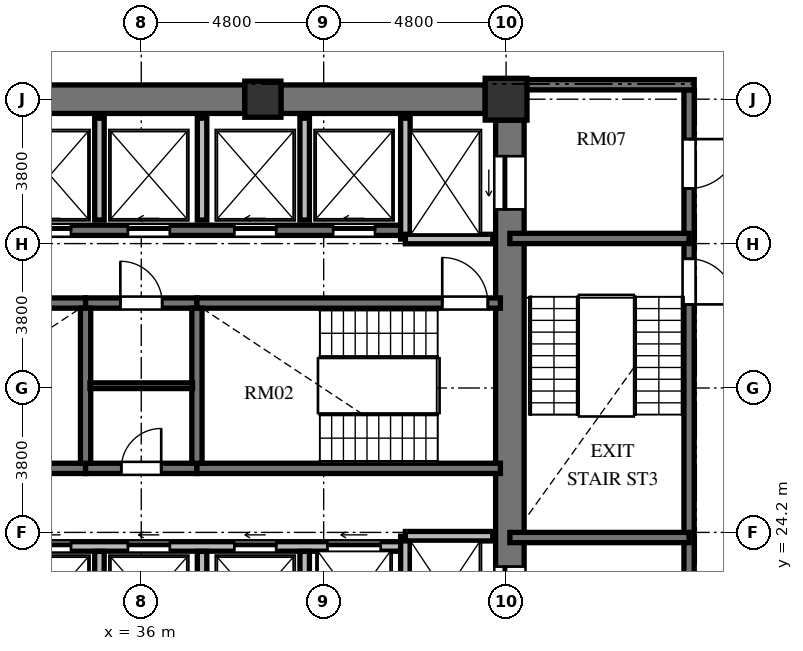
"""IFC4 building model, lengths in metres.
Left out: names, types, materials, properties, quantities, classifications, styles, units other than length and angle.
Written with IfcOpenShell. Run it as: python <this file> out.ifc"""

import sys

from ifc_helpers import new_model, si_unit, direction, frame, frame_2d, origin, origin_2d, place, context, subcontext, project, spatial, rectangle, extrude, element, fill, save


model = new_model("IFC4")
c1 = context("Model", 3, precision=1e-05, world=origin(), true_north=direction((0.0, 1.0)))
c2 = subcontext(c1, "Body", "Model", "MODEL_VIEW")
j1 = project(units=[si_unit("LENGTHUNIT", "METRE"), si_unit("PLANEANGLEUNIT", "RADIAN")], contexts=[c1])
p1 = place(None, origin())
s1 = spatial("IfcSite", under=j1, at=p1, CompositionType="ELEMENT")
p2 = place(p1, origin())
s2 = spatial("IfcBuilding", under=s1, at=p2, CompositionType="ELEMENT")
p3 = place(p2, frame((0.0, 0.0, 103.632)))
s3 = spatial("IfcBuildingStorey", under=s2, at=p3, CompositionType="ELEMENT", Elevation=103.632)
p4 = place(p3, frame((45.6, 35.6, 0.0), z_axis=(0.0, 0.0, 1.0), x_axis=(1.0, 0.0, 0.0)))
e1 = element("IfcColumn", 1, at=p4, inside=s3, PredefinedType="COLUMN", context=c2, shape_type="SweptSolid", body=[
    extrude(rectangle(XDim=1.1, YDim=1.1, at=origin_2d()), origin(), (0.0, 0.0, 1.0), 3.648),
])
p5 = place(p3, frame((39.2, 35.6, 0.0), z_axis=(0.0, 0.0, 1.0), x_axis=(1.0, 0.0, 0.0)))
e2 = element("IfcColumn", 2, at=p5, inside=s3, PredefinedType="COLUMN", context=c2, shape_type="SweptSolid", body=[
    extrude(rectangle(XDim=0.95, YDim=0.95, at=origin_2d()), origin(), (0.0, 0.0, 1.0), 3.648),
])
p6 = place(p3, frame((45.7, 20.95, 0.0), z_axis=(0.0, 0.0, 1.0), x_axis=(0.0, 1.0, 0.0)))
e3 = element("IfcWall", 3, at=p6, inside=s3, PredefinedType="SHEAR", context=c2, shape_type="SweptSolid", body=[
    extrude(rectangle(XDim=14.1, YDim=0.75, at=frame_2d((7.05, 0.0))), origin(), (0.0, 0.0, 1.0), 3.648),
])
p7 = place(p6, frame((11.75, 0.0, 0.0)))
e4 = element("IfcOpeningElement", 4, at=p7, cuts=e3, PredefinedType="OPENING", context=c2, shape_type="SweptSolid", body=[
    extrude(rectangle(XDim=1.4, YDim=2.3, at=frame_2d((0.7, 1.15))), frame((0.0, 0.385, 0.0), z_axis=(0.0, -1.0, 0.0), x_axis=(1.0, 0.0, 0.0)), (0.0, 0.0, 1.0), 0.77),
])
p8 = place(p6, frame((0.95, 0.0, 0.0)))
e5 = element("IfcOpeningElement", 5, at=p8, cuts=e3, PredefinedType="OPENING", context=c2, shape_type="SweptSolid", body=[
    extrude(rectangle(XDim=1.4, YDim=2.3, at=frame_2d((0.7, 1.15))), frame((0.0, 0.385, 0.0), z_axis=(0.0, -1.0, 0.0), x_axis=(1.0, 0.0, 0.0)), (0.0, 0.0, 1.0), 0.77),
])
p9 = place(p3, frame((33.275, 35.6, 0.0), z_axis=(0.0, 0.0, 1.0), x_axis=(1.0, 0.0, 0.0)))
e6 = element("IfcWall", 6, at=p9, inside=s3, PredefinedType="SHEAR", context=c2, shape_type="SweptSolid", body=[
    extrude(rectangle(XDim=5.45, YDim=0.75, at=frame_2d((2.725, 0.0))), origin(), (0.0, 0.0, 1.0), 3.648),
])
p10 = place(p3, frame((39.675, 35.6, 0.0), z_axis=(0.0, 0.0, 1.0), x_axis=(1.0, 0.0, 0.0)))
e7 = element("IfcWall", 7, at=p10, inside=s3, PredefinedType="SHEAR", context=c2, shape_type="SweptSolid", body=[
    extrude(rectangle(XDim=5.375, YDim=0.75, at=frame_2d((2.688, 0.0))), origin(), (0.0, 0.0, 1.0), 3.648),
])
p11 = place(p3, frame((26.55, 30.235, 0.0), z_axis=(0.0, 0.0, 1.0), x_axis=(1.0, 0.0, 0.0)))
e8 = element("IfcWall", 8, at=p11, inside=s3, PredefinedType="SHEAR", context=c2, shape_type="SweptSolid", body=[
    extrude(rectangle(XDim=7.985, YDim=0.27, at=frame_2d((3.992, 0.0))), origin(), (0.0, 0.0, 1.0), 3.648),
])
p12 = place(p3, frame((34.535, 30.235, 0.0), z_axis=(0.0, 0.0, 1.0), x_axis=(1.0, 0.0, 0.0)))
e9 = element("IfcWall", 9, at=p12, inside=s3, PredefinedType="SHEAR", context=c2, shape_type="SweptSolid", body=[
    extrude(rectangle(XDim=2.93, YDim=0.27, at=frame_2d((1.465, 0.0))), origin(), (0.0, 0.0, 1.0), 3.648),
])
p13 = place(p12, frame((0.915, 0.0, 0.0)))
e10 = element("IfcOpeningElement", 10, at=p13, cuts=e9, PredefinedType="OPENING", context=c2, shape_type="SweptSolid", body=[
    extrude(rectangle(XDim=1.1, YDim=2.15, at=frame_2d((0.55, 1.075))), frame((0.0, 0.145, 0.0), z_axis=(0.0, -1.0, 0.0), x_axis=(1.0, 0.0, 0.0)), (0.0, 0.0, 1.0), 0.29),
])
p14 = place(p3, frame((37.465, 30.235, 0.0), z_axis=(0.0, 0.0, 1.0), x_axis=(1.0, 0.0, 0.0)))
e11 = element("IfcWall", 11, at=p14, inside=s3, PredefinedType="SHEAR", context=c2, shape_type="SweptSolid", body=[
    extrude(rectangle(XDim=7.985, YDim=0.27, at=frame_2d((3.992, 0.0))), origin(), (0.0, 0.0, 1.0), 3.648),
])
p15 = place(p14, frame((6.455, 0.0, 0.0)))
e12 = element("IfcOpeningElement", 12, at=p15, cuts=e11, PredefinedType="OPENING", context=c2, shape_type="SweptSolid", body=[
    extrude(rectangle(XDim=1.2, YDim=2.15, at=frame_2d((0.6, 1.075))), frame((0.0, 0.145, 0.0), z_axis=(0.0, -1.0, 0.0), x_axis=(1.0, 0.0, 0.0)), (0.0, 0.0, 1.0), 0.29),
])
p16 = place(p3, frame((26.55, 25.885, 0.0), z_axis=(0.0, 0.0, 1.0), x_axis=(1.0, 0.0, 0.0)))
e13 = element("IfcWall", 13, at=p16, inside=s3, PredefinedType="SHEAR", context=c2, shape_type="SweptSolid", body=[
    extrude(rectangle(XDim=7.985, YDim=0.27, at=frame_2d((3.992, 0.0))), origin(), (0.0, 0.0, 1.0), 3.648),
])
p17 = place(p3, frame((34.535, 25.885, 0.0), z_axis=(0.0, 0.0, 1.0), x_axis=(1.0, 0.0, 0.0)))
e14 = element("IfcWall", 14, at=p17, inside=s3, PredefinedType="SHEAR", context=c2, shape_type="SweptSolid", body=[
    extrude(rectangle(XDim=2.93, YDim=0.27, at=frame_2d((1.465, 0.0))), origin(), (0.0, 0.0, 1.0), 3.648),
])
p18 = place(p17, frame((0.94, 0.0, 0.0)))
e15 = element("IfcOpeningElement", 15, at=p18, cuts=e14, PredefinedType="OPENING", context=c2, shape_type="SweptSolid", body=[
    extrude(rectangle(XDim=1.05, YDim=2.15, at=frame_2d((0.525, 1.075))), frame((0.0, 0.145, 0.0), z_axis=(0.0, -1.0, 0.0), x_axis=(1.0, 0.0, 0.0)), (0.0, 0.0, 1.0), 0.29),
])
p19 = place(p3, frame((37.465, 25.885, 0.0), z_axis=(0.0, 0.0, 1.0), x_axis=(1.0, 0.0, 0.0)))
e16 = element("IfcWall", 16, at=p19, inside=s3, PredefinedType="SHEAR", context=c2, shape_type="SweptSolid", body=[
    extrude(rectangle(XDim=7.985, YDim=0.27, at=frame_2d((3.992, 0.0))), origin(), (0.0, 0.0, 1.0), 3.648),
])
for number, where, z_axis, x_axis in (
    (17, (34.535, 26.02, 0.0), (0.0, 0.0, 1.0), (0.0, 1.0, 0.0)),
    (18, (37.465, 26.02, 0.0), (0.0, 0.0, 1.0), (0.0, 1.0, 0.0)),
):
    element("IfcWall", number, at=place(p3, frame(where, z_axis=z_axis, x_axis=x_axis)), inside=s3, PredefinedType="SHEAR", context=c2, shape_type="SweptSolid", body=[
        extrude(rectangle(XDim=4.08, YDim=0.27, at=frame_2d((2.04, 0.0))), origin(), (0.0, 0.0, 1.0), 3.648),
    ])
p20 = place(p3, frame((34.65, 28.06, 0.0), z_axis=(0.0, 0.0, 1.0), x_axis=(1.0, 0.0, 0.0)))
e19 = element("IfcWall", 19, at=p20, inside=s3, PredefinedType="PARTITIONING", context=c2, shape_type="SweptSolid", body=[
    extrude(rectangle(XDim=2.7, YDim=0.15, at=frame_2d((1.35, 0.0))), origin(), (0.0, 0.0, 1.0), 3.428),
])
p21 = place(p3, frame((26.55, 32.15, 0.0), z_axis=(0.0, 0.0, 1.0), x_axis=(1.0, 0.0, 0.0)))
e20 = element("IfcWall", 20, at=p21, inside=s3, PredefinedType="SHEAR", context=c2, shape_type="SweptSolid", body=[
    extrude(rectangle(XDim=16.4, YDim=0.27, at=frame_2d((8.2, 0.0))), origin(), (0.0, 0.0, 1.0), 3.648),
])
p22 = place(p21, frame((1.1, 0.0, 0.0)))
e21 = element("IfcOpeningElement", 21, at=p22, cuts=e20, PredefinedType="OPENING", context=c2, shape_type="SweptSolid", body=[
    extrude(rectangle(XDim=1.1, YDim=2.2, at=frame_2d((0.55, 1.1))), frame((0.0, 0.145, 0.0), z_axis=(0.0, -1.0, 0.0), x_axis=(1.0, 0.0, 0.0)), (0.0, 0.0, 1.0), 0.29),
])
p23 = place(p21, frame((3.7, 0.0, 0.0)))
e22 = element("IfcOpeningElement", 22, at=p23, cuts=e20, PredefinedType="OPENING", context=c2, shape_type="SweptSolid", body=[
    extrude(rectangle(XDim=1.1, YDim=2.2, at=frame_2d((0.55, 1.1))), frame((0.0, 0.145, 0.0), z_axis=(0.0, -1.0, 0.0), x_axis=(1.0, 0.0, 0.0)), (0.0, 0.0, 1.0), 0.29),
])
p24 = place(p21, frame((6.5, 0.0, 0.0)))
e23 = element("IfcOpeningElement", 23, at=p24, cuts=e20, PredefinedType="OPENING", context=c2, shape_type="SweptSolid", body=[
    extrude(rectangle(XDim=1.1, YDim=2.2, at=frame_2d((0.55, 1.1))), frame((0.0, 0.145, 0.0), z_axis=(0.0, -1.0, 0.0), x_axis=(1.0, 0.0, 0.0)), (0.0, 0.0, 1.0), 0.29),
])
p25 = place(p21, frame((9.1, 0.0, 0.0)))
e24 = element("IfcOpeningElement", 24, at=p25, cuts=e20, PredefinedType="OPENING", context=c2, shape_type="SweptSolid", body=[
    extrude(rectangle(XDim=1.1, YDim=2.2, at=frame_2d((0.55, 1.1))), frame((0.0, 0.145, 0.0), z_axis=(0.0, -1.0, 0.0), x_axis=(1.0, 0.0, 0.0)), (0.0, 0.0, 1.0), 0.29),
])
p26 = place(p21, frame((11.9, 0.0, 0.0)))
e25 = element("IfcOpeningElement", 25, at=p26, cuts=e20, PredefinedType="OPENING", context=c2, shape_type="SweptSolid", body=[
    extrude(rectangle(XDim=1.1, YDim=2.2, at=frame_2d((0.55, 1.1))), frame((0.0, 0.145, 0.0), z_axis=(0.0, -1.0, 0.0), x_axis=(1.0, 0.0, 0.0)), (0.0, 0.0, 1.0), 0.29),
])
p27 = place(p21, frame((14.5, 0.0, 0.0)))
e26 = element("IfcOpeningElement", 26, at=p27, cuts=e20, PredefinedType="OPENING", context=c2, shape_type="SweptSolid", body=[
    extrude(rectangle(XDim=1.1, YDim=2.2, at=frame_2d((0.55, 1.1))), frame((0.0, 0.145, 0.0), z_axis=(0.0, -1.0, 0.0), x_axis=(1.0, 0.0, 0.0)), (0.0, 0.0, 1.0), 0.29),
])
p28 = place(p3, frame((26.75, 23.83, 0.0), z_axis=(0.0, 0.0, 1.0), x_axis=(1.0, 0.0, 0.0)))
e27 = element("IfcWall", 27, at=p28, inside=s3, PredefinedType="SOLIDWALL", context=c2, shape_type="SweptSolid", body=[
    extrude(rectangle(XDim=16.2, YDim=0.25, at=frame_2d((8.1, 0.0))), origin(), (0.0, 0.0, 1.0), 3.428),
])
p29 = place(p28, frame((0.9, 0.0, 0.0)))
e28 = element("IfcOpeningElement", 28, at=p29, cuts=e27, PredefinedType="OPENING", context=c2, shape_type="SweptSolid", body=[
    extrude(rectangle(XDim=1.1, YDim=2.2, at=frame_2d((0.55, 1.1))), frame((0.0, 0.135, 0.0), z_axis=(0.0, -1.0, 0.0), x_axis=(1.0, 0.0, 0.0)), (0.0, 0.0, 1.0), 0.27),
])
p30 = place(p28, frame((3.5, 0.0, 0.0)))
e29 = element("IfcOpeningElement", 29, at=p30, cuts=e27, PredefinedType="OPENING", context=c2, shape_type="SweptSolid", body=[
    extrude(rectangle(XDim=1.1, YDim=2.2, at=frame_2d((0.55, 1.1))), frame((0.0, 0.135, 0.0), z_axis=(0.0, -1.0, 0.0), x_axis=(1.0, 0.0, 0.0)), (0.0, 0.0, 1.0), 0.27),
])
p31 = place(p28, frame((6.3, 0.0, 0.0)))
e30 = element("IfcOpeningElement", 30, at=p31, cuts=e27, PredefinedType="OPENING", context=c2, shape_type="SweptSolid", body=[
    extrude(rectangle(XDim=1.1, YDim=2.2, at=frame_2d((0.55, 1.1))), frame((0.0, 0.135, 0.0), z_axis=(0.0, -1.0, 0.0), x_axis=(1.0, 0.0, 0.0)), (0.0, 0.0, 1.0), 0.27),
])
p32 = place(p28, frame((8.9, 0.0, 0.0)))
e31 = element("IfcOpeningElement", 31, at=p32, cuts=e27, PredefinedType="OPENING", context=c2, shape_type="SweptSolid", body=[
    extrude(rectangle(XDim=1.1, YDim=2.2, at=frame_2d((0.55, 1.1))), frame((0.0, 0.135, 0.0), z_axis=(0.0, -1.0, 0.0), x_axis=(1.0, 0.0, 0.0)), (0.0, 0.0, 1.0), 0.27),
])
p33 = place(p28, frame((11.7, 0.0, 0.0)))
e32 = element("IfcOpeningElement", 32, at=p33, cuts=e27, PredefinedType="OPENING", context=c2, shape_type="SweptSolid", body=[
    extrude(rectangle(XDim=1.1, YDim=2.2, at=frame_2d((0.55, 1.1))), frame((0.0, 0.135, 0.0), z_axis=(0.0, -1.0, 0.0), x_axis=(1.0, 0.0, 0.0)), (0.0, 0.0, 1.0), 0.27),
])
p34 = place(p28, frame((14.15, 0.0, 0.0)))
e33 = element("IfcOpeningElement", 33, at=p34, cuts=e27, PredefinedType="OPENING", context=c2, shape_type="SweptSolid", body=[
    extrude(rectangle(XDim=1.4, YDim=2.3, at=frame_2d((0.7, 1.15))), frame((0.0, 0.135, 0.0), z_axis=(0.0, -1.0, 0.0), x_axis=(1.0, 0.0, 0.0)), (0.0, 0.0, 1.0), 0.27),
])
p35 = place(p3, frame((42.95, 31.92, 0.0), z_axis=(0.0, 0.0, 1.0), x_axis=(0.0, 1.0, 0.0)))
e34 = element("IfcWall", 34, at=p35, inside=s3, PredefinedType="SOLIDWALL", context=c2, shape_type="SweptSolid", body=[
    extrude(rectangle(XDim=3.18, YDim=0.25, at=frame_2d((1.59, 0.0))), origin(), (0.0, 0.0, 1.0), 3.428),
])
p36 = place(p3, frame((42.95, 31.92, 0.0), z_axis=(0.0, 0.0, 1.0), x_axis=(1.0, 0.0, 0.0)))
e35 = element("IfcWall", 35, at=p36, inside=s3, PredefinedType="SOLIDWALL", context=c2, shape_type="SweptSolid", body=[
    extrude(rectangle(XDim=2.3, YDim=0.25, at=frame_2d((1.15, 0.0))), origin(), (0.0, 0.0, 1.0), 3.428),
])
p37 = place(p3, frame((42.95, 20.9, 0.0), z_axis=(0.0, 0.0, 1.0), x_axis=(0.0, 1.0, 0.0)))
e36 = element("IfcWall", 36, at=p37, inside=s3, PredefinedType="SOLIDWALL", context=c2, shape_type="SweptSolid", body=[
    extrude(rectangle(XDim=3.2, YDim=0.25, at=frame_2d((1.6, 0.0))), origin(), (0.0, 0.0, 1.0), 3.428),
])
p38 = place(p3, frame((42.95, 24.1, 0.0), z_axis=(0.0, 0.0, 1.0), x_axis=(1.0, 0.0, 0.0)))
e37 = element("IfcWall", 37, at=p38, inside=s3, PredefinedType="SOLIDWALL", context=c2, shape_type="SweptSolid", body=[
    extrude(rectangle(XDim=2.3, YDim=0.25, at=frame_2d((1.15, 0.0))), origin(), (0.0, 0.0, 1.0), 3.428),
])
p39 = place(p3, frame((34.9, 32.42, 0.0), z_axis=(0.0, 0.0, 1.0), x_axis=(0.0, 1.0, 0.0)))
e38 = element("IfcWall", 38, at=p39, inside=s3, PredefinedType="SOLIDWALL", context=c2, shape_type="SweptSolid", body=[
    extrude(rectangle(XDim=2.68, YDim=0.25, at=frame_2d((1.34, 0.0))), origin(), (0.0, 0.0, 1.0), 3.428),
])
p40 = place(p3, frame((34.9, 20.9, 0.0), z_axis=(0.0, 0.0, 1.0), x_axis=(0.0, 1.0, 0.0)))
e39 = element("IfcWall", 39, at=p40, inside=s3, PredefinedType="SOLIDWALL", context=c2, shape_type="SweptSolid", body=[
    extrude(rectangle(XDim=2.8, YDim=0.25, at=frame_2d((1.4, 0.0))), origin(), (0.0, 0.0, 1.0), 3.428),
])
p41 = place(p3, frame((37.6, 32.42, 0.0), z_axis=(0.0, 0.0, 1.0), x_axis=(0.0, 1.0, 0.0)))
e40 = element("IfcWall", 40, at=p41, inside=s3, PredefinedType="SOLIDWALL", context=c2, shape_type="SweptSolid", body=[
    extrude(rectangle(XDim=2.68, YDim=0.25, at=frame_2d((1.34, 0.0))), origin(), (0.0, 0.0, 1.0), 3.428),
])
p42 = place(p3, frame((37.6, 20.9, 0.0), z_axis=(0.0, 0.0, 1.0), x_axis=(0.0, 1.0, 0.0)))
e41 = element("IfcWall", 41, at=p42, inside=s3, PredefinedType="SOLIDWALL", context=c2, shape_type="SweptSolid", body=[
    extrude(rectangle(XDim=2.8, YDim=0.25, at=frame_2d((1.4, 0.0))), origin(), (0.0, 0.0, 1.0), 3.428),
])
p43 = place(p3, frame((40.3, 32.42, 0.0), z_axis=(0.0, 0.0, 1.0), x_axis=(0.0, 1.0, 0.0)))
e42 = element("IfcWall", 42, at=p43, inside=s3, PredefinedType="SOLIDWALL", context=c2, shape_type="SweptSolid", body=[
    extrude(rectangle(XDim=2.68, YDim=0.25, at=frame_2d((1.34, 0.0))), origin(), (0.0, 0.0, 1.0), 3.428),
])
p44 = place(p3, frame((40.3, 20.9, 0.0), z_axis=(0.0, 0.0, 1.0), x_axis=(0.0, 1.0, 0.0)))
e43 = element("IfcWall", 43, at=p44, inside=s3, PredefinedType="SOLIDWALL", context=c2, shape_type="SweptSolid", body=[
    extrude(rectangle(XDim=2.8, YDim=0.25, at=frame_2d((1.4, 0.0))), origin(), (0.0, 0.0, 1.0), 3.428),
])
p45 = place(p3, frame((50.415, 35.845, 0.0), z_axis=(0.0, 0.0, 1.0), x_axis=(0.0, -1.0, 0.0)))
e44 = element("IfcWall", 44, at=p45, inside=s3, PredefinedType="SHEAR", context=c2, shape_type="SweptSolid", body=[
    extrude(rectangle(XDim=15.825, YDim=0.27, at=frame_2d((7.913, 0.0))), origin(), (0.0, 0.0, 1.0), 3.648),
])
p46 = place(p45, frame((4.445, 0.0, 0.0)))
e45 = element("IfcOpeningElement", 45, at=p46, cuts=e44, PredefinedType="OPENING", context=c2, shape_type="SweptSolid", body=[
    extrude(rectangle(XDim=1.2, YDim=2.15, at=frame_2d((0.6, 1.075))), frame((0.0, 0.145, 0.0), z_axis=(0.0, -1.0, 0.0), x_axis=(1.0, 0.0, 0.0)), (0.0, 0.0, 1.0), 0.29),
])
p47 = place(p45, frame((1.295, 0.0, 0.0)))
e46 = element("IfcOpeningElement", 46, at=p47, cuts=e44, PredefinedType="OPENING", context=c2, shape_type="SweptSolid", body=[
    extrude(rectangle(XDim=1.3, YDim=2.2, at=frame_2d((0.65, 1.1))), frame((0.0, 0.145, 0.0), z_axis=(0.0, -1.0, 0.0), x_axis=(1.0, 0.0, 0.0)), (0.0, 0.0, 1.0), 0.29),
])
p48 = place(p45, frame((13.095, 0.0, 0.0)))
e47 = element("IfcOpeningElement", 47, at=p48, cuts=e44, PredefinedType="OPENING", context=c2, shape_type="SweptSolid", body=[
    extrude(rectangle(XDim=1.3, YDim=2.2, at=frame_2d((0.65, 1.1))), frame((0.0, 0.145, 0.0), z_axis=(0.0, -1.0, 0.0), x_axis=(1.0, 0.0, 0.0)), (0.0, 0.0, 1.0), 0.29),
])
p49 = place(p3, frame((46.075, 35.98, 0.0), z_axis=(0.0, 0.0, 1.0), x_axis=(1.0, 0.0, 0.0)))
e48 = element("IfcWall", 48, at=p49, inside=s3, PredefinedType="SHEAR", context=c2, shape_type="SweptSolid", body=[
    extrude(rectangle(XDim=4.475, YDim=0.27, at=frame_2d((2.238, 0.0))), origin(), (0.0, 0.0, 1.0), 3.648),
])
for number, where, z_axis, x_axis in (
    (49, (45.7, 31.935, 0.0), (0.0, 0.0, 1.0), (1.0, 0.0, 0.0)),
    (50, (45.7, 24.065, 0.0), (0.0, 0.0, 1.0), (1.0, 0.0, 0.0)),
):
    element("IfcWall", number, at=place(p3, frame(where, z_axis=z_axis, x_axis=x_axis)), inside=s3, PredefinedType="SHEAR", context=c2, shape_type="SweptSolid", body=[
        extrude(rectangle(XDim=4.715, YDim=0.27, at=frame_2d((2.357, 0.0))), origin(), (0.0, 0.0, 1.0), 3.648),
    ])
p50 = place(p15, origin())
e51 = element("IfcDoor", 51, at=p50, inside=s3, OperationType="SINGLE_SWING_LEFT", PredefinedType="DOOR", context=c2, shape_type="SweptSolid", body=[
    extrude(rectangle(XDim=1.2, YDim=2.15, at=frame_2d((0.6, 1.075))), frame((0.0, 0.025, 0.0), z_axis=(0.0, -1.0, 0.0), x_axis=(1.0, 0.0, 0.0)), (0.0, 0.0, 1.0), 0.05),
])
fill(e12, e51)
p51 = place(p18, origin())
e52 = element("IfcDoor", 52, at=p51, inside=s3, OperationType="SINGLE_SWING_RIGHT", PredefinedType="DOOR", context=c2, shape_type="SweptSolid", body=[
    extrude(rectangle(XDim=1.05, YDim=2.15, at=frame_2d((0.525, 1.075))), frame((0.0, 0.025, 0.0), z_axis=(0.0, -1.0, 0.0), x_axis=(1.0, 0.0, 0.0)), (0.0, 0.0, 1.0), 0.05),
])
fill(e15, e52)
p52 = place(p13, origin())
e53 = element("IfcDoor", 53, at=p52, inside=s3, OperationType="SINGLE_SWING_LEFT", PredefinedType="DOOR", context=c2, shape_type="SweptSolid", body=[
    extrude(rectangle(XDim=1.1, YDim=2.15, at=frame_2d((0.55, 1.075))), frame((0.0, 0.025, 0.0), z_axis=(0.0, -1.0, 0.0), x_axis=(1.0, 0.0, 0.0)), (0.0, 0.0, 1.0), 0.05),
])
fill(e10, e53)
p53 = place(p24, origin())
e54 = element("IfcDoor", 54, at=p53, inside=s3, OperationType="SLIDING_TO_LEFT", PredefinedType="DOOR", context=c2, shape_type="SweptSolid", body=[
    extrude(rectangle(XDim=1.1, YDim=2.2, at=frame_2d((0.55, 1.1))), frame((0.0, 0.025, 0.0), z_axis=(0.0, -1.0, 0.0), x_axis=(1.0, 0.0, 0.0)), (0.0, 0.0, 1.0), 0.05),
])
fill(e23, e54)
p54 = place(p25, origin())
e55 = element("IfcDoor", 55, at=p54, inside=s3, OperationType="SLIDING_TO_LEFT", PredefinedType="DOOR", context=c2, shape_type="SweptSolid", body=[
    extrude(rectangle(XDim=1.1, YDim=2.2, at=frame_2d((0.55, 1.1))), frame((0.0, 0.025, 0.0), z_axis=(0.0, -1.0, 0.0), x_axis=(1.0, 0.0, 0.0)), (0.0, 0.0, 1.0), 0.05),
])
fill(e24, e55)
p55 = place(p31, origin())
e56 = element("IfcDoor", 56, at=p55, inside=s3, OperationType="SLIDING_TO_LEFT", PredefinedType="DOOR", context=c2, shape_type="SweptSolid", body=[
    extrude(rectangle(XDim=1.1, YDim=2.2, at=frame_2d((0.55, 1.1))), frame((0.0, 0.025, 0.0), z_axis=(0.0, -1.0, 0.0), x_axis=(1.0, 0.0, 0.0)), (0.0, 0.0, 1.0), 0.05),
])
fill(e30, e56)
p56 = place(p32, origin())
e57 = element("IfcDoor", 57, at=p56, inside=s3, OperationType="SLIDING_TO_LEFT", PredefinedType="DOOR", context=c2, shape_type="SweptSolid", body=[
    extrude(rectangle(XDim=1.1, YDim=2.2, at=frame_2d((0.55, 1.1))), frame((0.0, 0.025, 0.0), z_axis=(0.0, -1.0, 0.0), x_axis=(1.0, 0.0, 0.0)), (0.0, 0.0, 1.0), 0.05),
])
fill(e31, e57)
p57 = place(p26, origin())
e58 = element("IfcDoor", 58, at=p57, inside=s3, OperationType="SLIDING_TO_LEFT", PredefinedType="DOOR", context=c2, shape_type="SweptSolid", body=[
    extrude(rectangle(XDim=1.1, YDim=2.2, at=frame_2d((0.55, 1.1))), frame((0.0, 0.025, 0.0), z_axis=(0.0, -1.0, 0.0), x_axis=(1.0, 0.0, 0.0)), (0.0, 0.0, 1.0), 0.05),
])
fill(e25, e58)
p58 = place(p27, origin())
e59 = element("IfcDoor", 59, at=p58, inside=s3, OperationType="SLIDING_TO_LEFT", PredefinedType="DOOR", context=c2, shape_type="SweptSolid", body=[
    extrude(rectangle(XDim=1.1, YDim=2.2, at=frame_2d((0.55, 1.1))), frame((0.0, 0.025, 0.0), z_axis=(0.0, -1.0, 0.0), x_axis=(1.0, 0.0, 0.0)), (0.0, 0.0, 1.0), 0.05),
])
fill(e26, e59)
p59 = place(p33, origin())
e60 = element("IfcDoor", 60, at=p59, inside=s3, OperationType="SLIDING_TO_LEFT", PredefinedType="DOOR", context=c2, shape_type="SweptSolid", body=[
    extrude(rectangle(XDim=1.1, YDim=2.2, at=frame_2d((0.55, 1.1))), frame((0.0, 0.025, 0.0), z_axis=(0.0, -1.0, 0.0), x_axis=(1.0, 0.0, 0.0)), (0.0, 0.0, 1.0), 0.05),
])
fill(e32, e60)
p60 = place(p7, origin())
e61 = element("IfcDoor", 61, at=p60, inside=s3, OperationType="SLIDING_TO_LEFT", PredefinedType="DOOR", context=c2, shape_type="SweptSolid", body=[
    extrude(rectangle(XDim=1.4, YDim=2.3, at=frame_2d((0.7, 1.15))), frame((0.0, 0.025, 0.0), z_axis=(0.0, -1.0, 0.0), x_axis=(1.0, 0.0, 0.0)), (0.0, 0.0, 1.0), 0.05),
])
fill(e4, e61)
p61 = place(p8, origin())
e62 = element("IfcDoor", 62, at=p61, inside=s3, OperationType="SLIDING_TO_LEFT", PredefinedType="DOOR", context=c2, shape_type="SweptSolid", body=[
    extrude(rectangle(XDim=1.4, YDim=2.3, at=frame_2d((0.7, 1.15))), frame((0.0, 0.025, 0.0), z_axis=(0.0, -1.0, 0.0), x_axis=(1.0, 0.0, 0.0)), (0.0, 0.0, 1.0), 0.05),
])
fill(e5, e62)
p62 = place(p34, origin())
e63 = element("IfcDoor", 63, at=p62, inside=s3, OperationType="SLIDING_TO_LEFT", PredefinedType="DOOR", context=c2, shape_type="SweptSolid", body=[
    extrude(rectangle(XDim=1.4, YDim=2.3, at=frame_2d((0.7, 1.15))), frame((0.0, 0.025, 0.0), z_axis=(0.0, -1.0, 0.0), x_axis=(1.0, 0.0, 0.0)), (0.0, 0.0, 1.0), 0.05),
])
fill(e33, e63)
p63 = place(p46, origin())
e64 = element("IfcDoor", 64, at=p63, inside=s3, OperationType="SINGLE_SWING_RIGHT", PredefinedType="DOOR", context=c2, shape_type="SweptSolid", body=[
    extrude(rectangle(XDim=1.2, YDim=2.15, at=frame_2d((0.6, 1.075))), frame((0.0, 0.025, 0.0), z_axis=(0.0, -1.0, 0.0), x_axis=(1.0, 0.0, 0.0)), (0.0, 0.0, 1.0), 0.05),
])
fill(e45, e64)
p64 = place(p47, origin())
e65 = element("IfcDoor", 65, at=p64, inside=s3, OperationType="SINGLE_SWING_LEFT", PredefinedType="DOOR", context=c2, shape_type="SweptSolid", body=[
    extrude(rectangle(XDim=1.3, YDim=2.2, at=frame_2d((0.65, 1.1))), frame((0.0, 0.025, 0.0), z_axis=(0.0, -1.0, 0.0), x_axis=(1.0, 0.0, 0.0)), (0.0, 0.0, 1.0), 0.05),
])
fill(e46, e65)
save(model, sys.argv[1])
